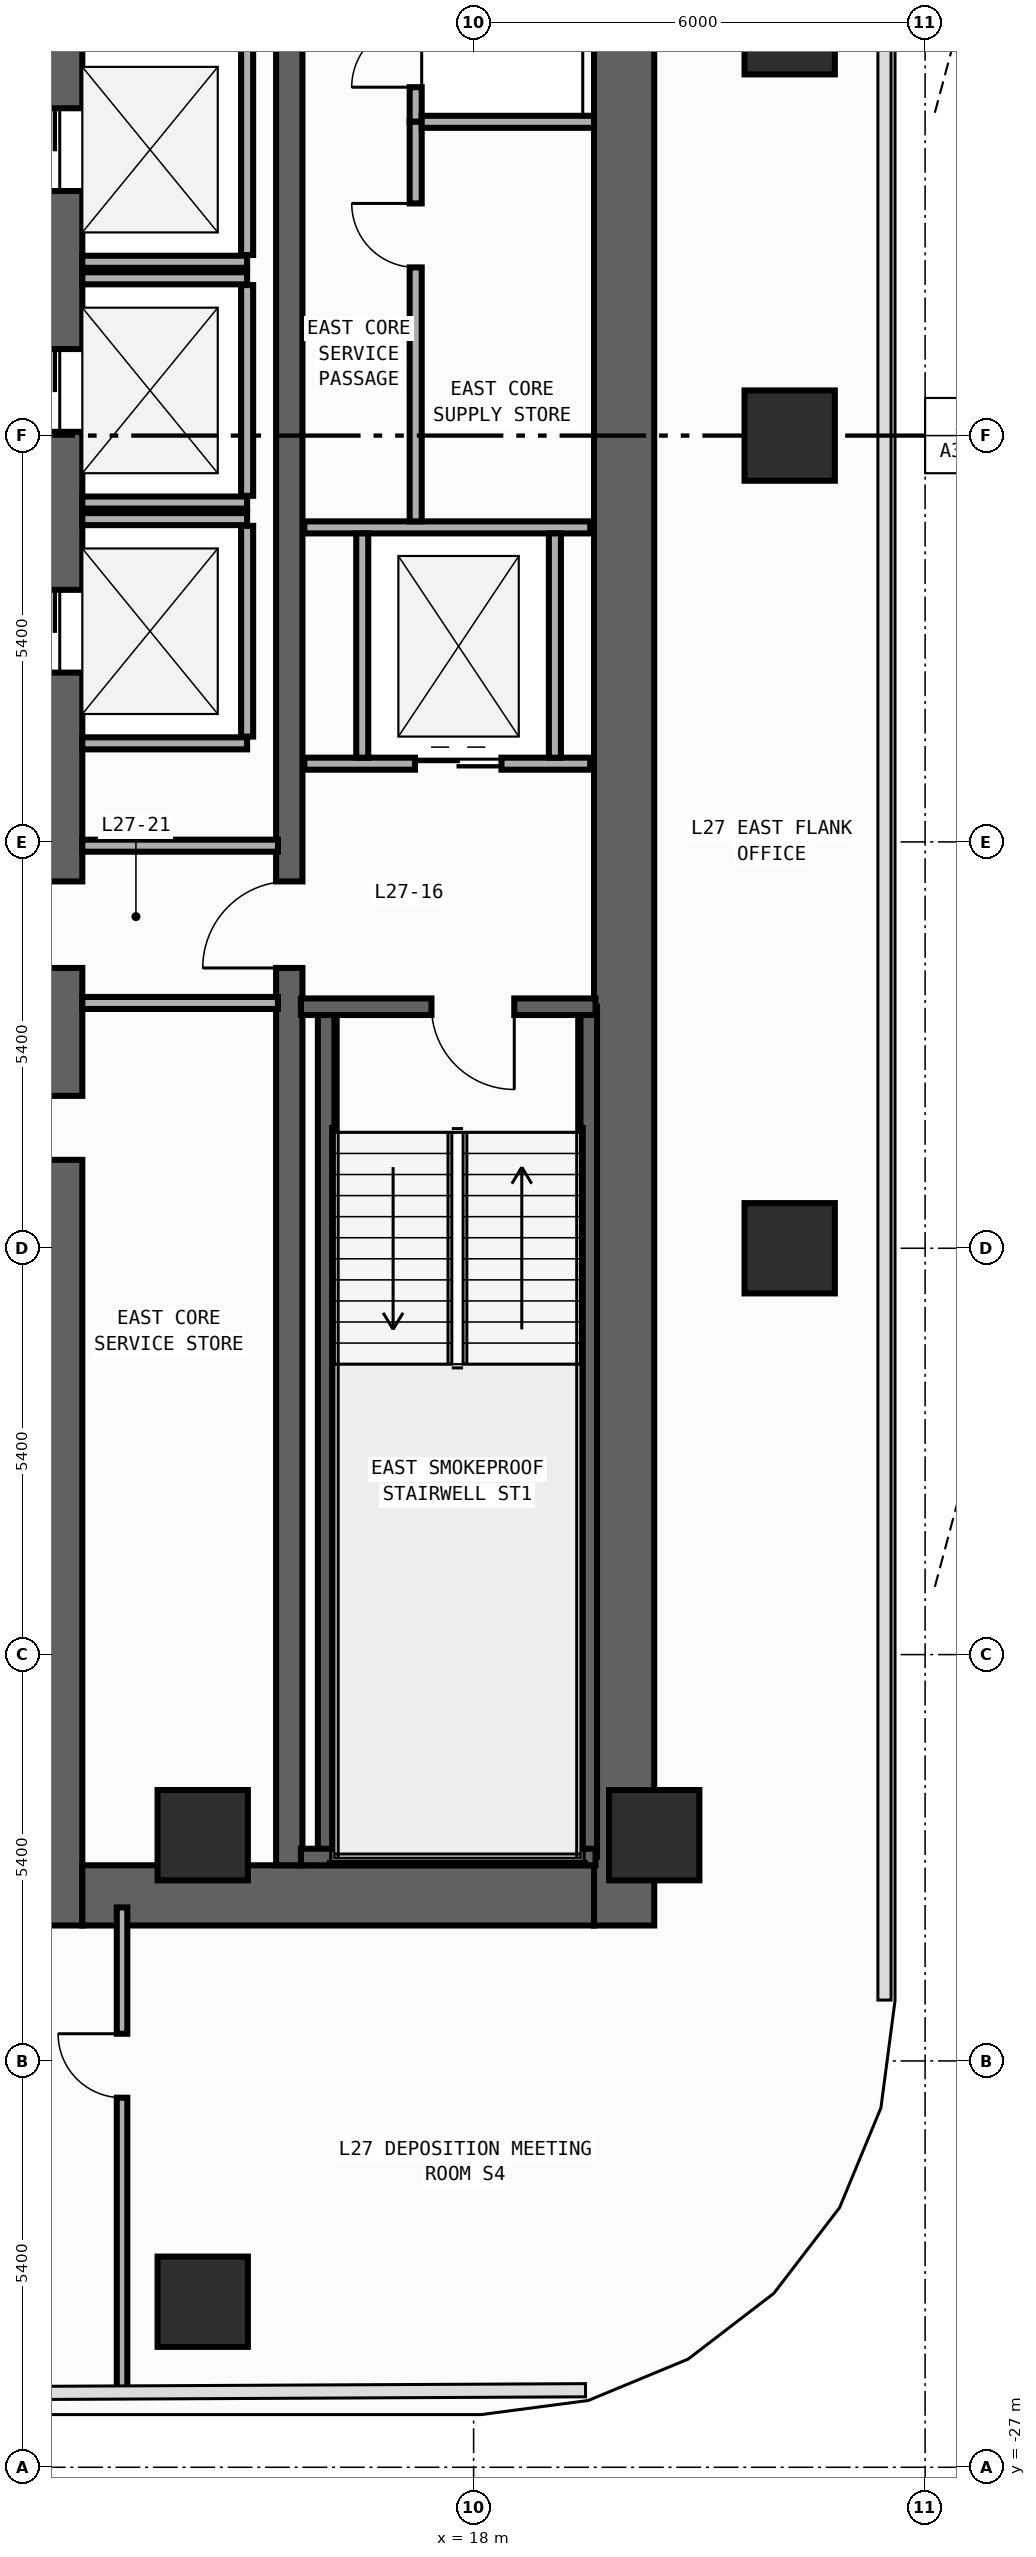
"""IFC4 building model, lengths in metres.
Left out: names, types, materials, properties, quantities, classifications, styles, units other than length and angle.
Written with IfcOpenShell. Run it as: python <this file> out.ifc"""

import sys

from ifc_helpers import new_model, si_unit, direction, frame, frame_2d, origin, origin_2d, place, context, subcontext, project, spatial, rectangle, extrude, element, fill, save


model = new_model("IFC4")
c1 = context("Model", 3, precision=1e-05, world=origin(), true_north=direction((0.0, 1.0)))
c2 = subcontext(c1, "Body", "Model", "MODEL_VIEW")
j1 = project(units=[si_unit("LENGTHUNIT", "METRE"), si_unit("PLANEANGLEUNIT", "RADIAN")], contexts=[c1])
p1 = place(None, origin())
s1 = spatial("IfcSite", under=j1, at=p1, CompositionType="ELEMENT")
p2 = place(p1, origin())
s2 = spatial("IfcBuilding", under=s1, at=p2, CompositionType="ELEMENT")
p3 = place(p2, frame((0.0, 0.0, 118.4)))
s3 = spatial("IfcBuildingStorey", under=s2, at=p3, CompositionType="ELEMENT", Elevation=118.4)
p4 = place(p3, frame((12.4, -19.8, 0.0), z_axis=(0.0, 0.0, 1.0), x_axis=(0.0, 1.0, 0.0)))
e1 = element("IfcWall", 1, at=p4, inside=s3, PredefinedType="SHEAR", context=c2, shape_type="SweptSolid", body=[
    extrude(rectangle(XDim=27.0, YDim=0.8, at=frame_2d((13.5, 0.0))), origin(), (0.0, 0.0, 1.0), 3.94),
])
p5 = place(p4, frame((23.05, 0.0, 0.0)))
e2 = element("IfcOpeningElement", 2, at=p5, cuts=e1, PredefinedType="OPENING", context=c2, shape_type="SweptSolid", body=[
    extrude(rectangle(XDim=1.1, YDim=2.2, at=frame_2d((0.55, 1.1))), frame((0.0, 0.41, 0.0), z_axis=(0.0, -1.0, 0.0), x_axis=(1.0, 0.0, 0.0)), (0.0, 0.0, 1.0), 0.82),
])
p6 = place(p4, frame((19.85, 0.0, 0.0)))
e3 = element("IfcOpeningElement", 3, at=p6, cuts=e1, PredefinedType="OPENING", context=c2, shape_type="SweptSolid", body=[
    extrude(rectangle(XDim=1.1, YDim=2.2, at=frame_2d((0.55, 1.1))), frame((0.0, 0.41, 0.0), z_axis=(0.0, -1.0, 0.0), x_axis=(1.0, 0.0, 0.0)), (0.0, 0.0, 1.0), 0.82),
])
p7 = place(p4, frame((16.65, 0.0, 0.0)))
e4 = element("IfcOpeningElement", 4, at=p7, cuts=e1, PredefinedType="OPENING", context=c2, shape_type="SweptSolid", body=[
    extrude(rectangle(XDim=1.1, YDim=2.2, at=frame_2d((0.55, 1.1))), frame((0.0, 0.41, 0.0), z_axis=(0.0, -1.0, 0.0), x_axis=(1.0, 0.0, 0.0)), (0.0, 0.0, 1.0), 0.82),
])
p8 = place(p4, frame((10.175, 0.0, 0.0)))
e5 = element("IfcOpeningElement", 5, at=p8, cuts=e1, PredefinedType="OPENING", context=c2, shape_type="SweptSolid", body=[
    extrude(rectangle(XDim=0.85, YDim=2.1, at=frame_2d((0.425, 1.05))), frame((0.0, 0.41, 0.0), z_axis=(0.0, -1.0, 0.0), x_axis=(1.0, 0.0, 0.0)), (0.0, 0.0, 1.0), 0.82),
])
p9 = place(p4, frame((12.725, 0.0, 0.0)))
e6 = element("IfcOpeningElement", 6, at=p9, cuts=e1, PredefinedType="OPENING", context=c2, shape_type="SweptSolid", body=[
    extrude(rectangle(XDim=1.15, YDim=2.2, at=frame_2d((0.575, 1.1))), frame((0.0, 0.41, 0.0), z_axis=(0.0, -1.0, 0.0), x_axis=(1.0, 0.0, 0.0)), (0.0, 0.0, 1.0), 0.82),
])
p10 = place(p4, frame((25.125, 0.0, 0.0)))
e7 = element("IfcOpeningElement", 7, at=p10, cuts=e1, PredefinedType="OPENING", context=c2, shape_type="SweptSolid", body=[
    extrude(rectangle(XDim=0.85, YDim=2.1, at=frame_2d((0.425, 1.05))), frame((0.0, 0.41, 0.0), z_axis=(0.0, -1.0, 0.0), x_axis=(1.0, 0.0, 0.0)), (0.0, 0.0, 1.0), 0.82),
])
p11 = place(p3, frame((20.0, -19.8, 0.0), z_axis=(0.0, 0.0, 1.0), x_axis=(0.0, 1.0, 0.0)))
e8 = element("IfcWall", 8, at=p11, inside=s3, PredefinedType="SHEAR", context=c2, shape_type="SweptSolid", body=[
    extrude(rectangle(XDim=27.0, YDim=0.8, at=frame_2d((13.5, 0.0))), origin(), (0.0, 0.0, 1.0), 3.94),
])
p12 = place(p3, frame((12.8, -19.4, 0.0), z_axis=(0.0, 0.0, 1.0), x_axis=(1.0, 0.0, 0.0)))
e9 = element("IfcWall", 9, at=p12, inside=s3, PredefinedType="SHEAR", context=c2, shape_type="SweptSolid", body=[
    extrude(rectangle(XDim=6.8, YDim=0.8, at=frame_2d((3.4, 0.0))), origin(), (0.0, 0.0, 1.0), 3.94),
])
p13 = place(p3, frame((15.55, -19.0, 0.0), z_axis=(0.0, 0.0, 1.0), x_axis=(0.0, 1.0, 0.0)))
e10 = element("IfcWall", 10, at=p13, inside=s3, PredefinedType="SHEAR", context=c2, shape_type="SweptSolid", body=[
    extrude(rectangle(XDim=25.4, YDim=0.35, at=frame_2d((12.7, 0.0))), origin(), (0.0, 0.0, 1.0), 3.94),
])
p14 = place(p13, frame((11.925, 0.0, 0.0)))
e11 = element("IfcOpeningElement", 11, at=p14, cuts=e10, PredefinedType="OPENING", context=c2, shape_type="SweptSolid", body=[
    extrude(rectangle(XDim=1.15, YDim=2.2, at=frame_2d((0.575, 1.1))), frame((0.0, 0.185, 0.0), z_axis=(0.0, -1.0, 0.0), x_axis=(1.0, 0.0, 0.0)), (0.0, 0.0, 1.0), 0.37),
])
p15 = place(p13, frame((24.325, 0.0, 0.0)))
e12 = element("IfcOpeningElement", 12, at=p15, cuts=e10, PredefinedType="OPENING", context=c2, shape_type="SweptSolid", body=[
    extrude(rectangle(XDim=0.85, YDim=2.1, at=frame_2d((0.425, 1.05))), frame((0.0, 0.185, 0.0), z_axis=(0.0, -1.0, 0.0), x_axis=(1.0, 0.0, 0.0)), (0.0, 0.0, 1.0), 0.37),
])
for number, where, z_axis, x_axis in (
    (13, (16.04, -18.89, 0.0), (0.0, 0.0, 1.0), (0.0, 1.0, 0.0)),
    (14, (19.53, -18.89, 0.0), (0.0, 0.0, 1.0), (0.0, 1.0, 0.0)),
):
    element("IfcWall", number, at=place(p3, frame(where, z_axis=z_axis, x_axis=x_axis)), inside=s3, PredefinedType="SHEAR", context=c2, shape_type="SweptSolid", body=[
        extrude(rectangle(XDim=11.3, YDim=0.22, at=frame_2d((5.65, 0.0))), origin(), (0.0, 0.0, 1.0), 3.94),
    ])
p16 = place(p3, frame((15.705, -18.89, 0.0), z_axis=(0.0, 0.0, 1.0), x_axis=(1.0, 0.0, 0.0)))
e15 = element("IfcWall", 15, at=p16, inside=s3, PredefinedType="SHEAR", context=c2, shape_type="SweptSolid", body=[
    extrude(rectangle(XDim=3.915, YDim=0.22, at=frame_2d((1.958, 0.0))), origin(), (0.0, 0.0, 1.0), 3.94),
])
p17 = place(p3, frame((19.62, -7.59, 0.0), z_axis=(0.0, 0.0, 1.0), x_axis=(-1.0, 0.0, 0.0)))
e16 = element("IfcWall", 16, at=p17, inside=s3, PredefinedType="SHEAR", context=c2, shape_type="SweptSolid", body=[
    extrude(rectangle(XDim=3.915, YDim=0.22, at=frame_2d((1.958, 0.0))), origin(), (0.0, 0.0, 1.0), 3.94),
])
p18 = place(p17, frame((1.08, 0.0, 0.0)))
e17 = element("IfcOpeningElement", 17, at=p18, cuts=e16, PredefinedType="OPENING", context=c2, shape_type="SweptSolid", body=[
    extrude(rectangle(XDim=1.1, YDim=2.2, at=frame_2d((0.55, 1.1))), frame((0.0, 0.12, 0.0), z_axis=(0.0, -1.0, 0.0), x_axis=(1.0, 0.0, 0.0)), (0.0, 0.0, 1.0), 0.24),
])
for number, where, z_axis, x_axis in (
    (18, (20.4, -18.6, 0.0), (0.0, 0.0, 1.0), (1.0, 0.0, 0.0)),
    (19, (14.4, -18.6, 0.0), (0.0, 0.0, 1.0), (1.0, 0.0, 0.0)),
    (20, (22.2, -10.8, 0.0), (0.0, 0.0, 1.0), (1.0, 0.0, 0.0)),
    (21, (22.2, 0.0, 0.0), (0.0, 0.0, 1.0), (1.0, 0.0, 0.0)),
    (22, (22.2, 5.4, 0.0), (0.0, 0.0, 1.0), (1.0, 0.0, 0.0)),
    (23, (14.4, -24.8, 0.0), (0.0, 0.0, 1.0), (1.0, 0.0, 0.0)),
):
    element("IfcColumn", number, at=place(p3, frame(where, z_axis=z_axis, x_axis=x_axis)), inside=s3, PredefinedType="COLUMN", context=c2, shape_type="SweptSolid", body=[
        extrude(rectangle(XDim=1.2, YDim=1.2, at=origin_2d()), origin(), (0.0, 0.0, 1.0), 4.2),
    ])
p19 = place(p3, frame((12.8, 2.31, 0.0), z_axis=(0.0, 0.0, 1.0), x_axis=(1.0, 0.0, 0.0)))
e24 = element("IfcWall", 24, at=p19, inside=s3, PredefinedType="STANDARD", context=c2, shape_type="SweptSolid", body=[
    extrude(rectangle(XDim=2.19, YDim=0.16, at=frame_2d((1.095, 0.0))), origin(), (0.0, 0.0, 1.0), 3.94),
])
p20 = place(p3, frame((14.99, 2.4, 0.0), z_axis=(0.0, 0.0, 1.0), x_axis=(0.0, 1.0, 0.0)))
e25 = element("IfcWall", 25, at=p20, inside=s3, PredefinedType="STANDARD", context=c2, shape_type="SweptSolid", body=[
    extrude(rectangle(XDim=2.8, YDim=0.16, at=frame_2d((1.4, 0.0))), origin(), (0.0, 0.0, 1.0), 3.94),
])
for number, where, z_axis, x_axis in (
    (26, (12.8, -0.89, 0.0), (0.0, 0.0, 1.0), (1.0, 0.0, 0.0)),
    (27, (12.8, 2.09, 0.0), (0.0, 0.0, 1.0), (1.0, 0.0, 0.0)),
):
    element("IfcWall", number, at=place(p3, frame(where, z_axis=z_axis, x_axis=x_axis)), inside=s3, PredefinedType="STANDARD", context=c2, shape_type="SweptSolid", body=[
        extrude(rectangle(XDim=2.19, YDim=0.16, at=frame_2d((1.095, 0.0))), origin(), (0.0, 0.0, 1.0), 3.94),
    ])
p21 = place(p3, frame((14.99, -0.8, 0.0), z_axis=(0.0, 0.0, 1.0), x_axis=(0.0, 1.0, 0.0)))
e28 = element("IfcWall", 28, at=p21, inside=s3, PredefinedType="STANDARD", context=c2, shape_type="SweptSolid", body=[
    extrude(rectangle(XDim=2.8, YDim=0.16, at=frame_2d((1.4, 0.0))), origin(), (0.0, 0.0, 1.0), 3.94),
])
for number, where, z_axis, x_axis in (
    (29, (12.8, -4.09, 0.0), (0.0, 0.0, 1.0), (1.0, 0.0, 0.0)),
    (30, (12.8, -1.11, 0.0), (0.0, 0.0, 1.0), (1.0, 0.0, 0.0)),
):
    element("IfcWall", number, at=place(p3, frame(where, z_axis=z_axis, x_axis=x_axis)), inside=s3, PredefinedType="STANDARD", context=c2, shape_type="SweptSolid", body=[
        extrude(rectangle(XDim=2.19, YDim=0.16, at=frame_2d((1.095, 0.0))), origin(), (0.0, 0.0, 1.0), 3.94),
    ])
p22 = place(p3, frame((14.99, -4.0, 0.0), z_axis=(0.0, 0.0, 1.0), x_axis=(0.0, 1.0, 0.0)))
e31 = element("IfcWall", 31, at=p22, inside=s3, PredefinedType="STANDARD", context=c2, shape_type="SweptSolid", body=[
    extrude(rectangle(XDim=2.8, YDim=0.16, at=frame_2d((1.4, 0.0))), origin(), (0.0, 0.0, 1.0), 3.94),
])
p23 = place(p3, frame((15.75, -4.36, 0.0), z_axis=(0.0, 0.0, 1.0), x_axis=(1.0, 0.0, 0.0)))
e32 = element("IfcWall", 32, at=p23, inside=s3, PredefinedType="STANDARD", context=c2, shape_type="SweptSolid", body=[
    extrude(rectangle(XDim=3.8, YDim=0.16, at=frame_2d((1.9, 0.0))), origin(), (0.0, 0.0, 1.0), 3.94),
])
p24 = place(p23, frame((1.47, 0.0, 0.0)))
e33 = element("IfcOpeningElement", 33, at=p24, cuts=e32, PredefinedType="OPENING", context=c2, shape_type="SweptSolid", body=[
    extrude(rectangle(XDim=1.15, YDim=2.2, at=frame_2d((0.575, 1.1))), frame((0.0, 0.09, 0.0), z_axis=(0.0, -1.0, 0.0), x_axis=(1.0, 0.0, 0.0)), (0.0, 0.0, 1.0), 0.18),
])
p25 = place(p3, frame((15.75, -1.22, 0.0), z_axis=(0.0, 0.0, 1.0), x_axis=(1.0, 0.0, 0.0)))
e34 = element("IfcWall", 34, at=p25, inside=s3, PredefinedType="STANDARD", context=c2, shape_type="SweptSolid", body=[
    extrude(rectangle(XDim=3.8, YDim=0.16, at=frame_2d((1.9, 0.0))), origin(), (0.0, 0.0, 1.0), 3.94),
])
for number, where, z_axis, x_axis in (
    (35, (16.52, -4.28, 0.0), (0.0, 0.0, 1.0), (0.0, 1.0, 0.0)),
    (36, (19.08, -4.28, 0.0), (0.0, 0.0, 1.0), (0.0, 1.0, 0.0)),
):
    element("IfcWall", number, at=place(p3, frame(where, z_axis=z_axis, x_axis=x_axis)), inside=s3, PredefinedType="STANDARD", context=c2, shape_type="SweptSolid", body=[
        extrude(rectangle(XDim=2.98, YDim=0.16, at=frame_2d((1.49, 0.0))), origin(), (0.0, 0.0, 1.0), 3.94),
    ])
for number, where, z_axis, x_axis in (
    (37, (12.8, -5.45, 0.0), (0.0, 0.0, 1.0), (1.0, 0.0, 0.0)),
    (38, (12.8, -7.54, 0.0), (0.0, 0.0, 1.0), (1.0, 0.0, 0.0)),
):
    element("IfcWall", number, at=place(p3, frame(where, z_axis=z_axis, x_axis=x_axis)), inside=s3, PredefinedType="STANDARD", context=c2, shape_type="SweptSolid", body=[
        extrude(rectangle(XDim=2.6, YDim=0.16, at=frame_2d((1.3, 0.0))), origin(), (0.0, 0.0, 1.0), 3.94),
    ])
p26 = place(p3, frame((17.23, 4.17, 0.0), z_axis=(0.0, 0.0, 1.0), x_axis=(0.0, 1.0, 0.0)))
e39 = element("IfcWall", 39, at=p26, inside=s3, PredefinedType="PARTITIONING", context=c2, shape_type="SweptSolid", body=[
    extrude(rectangle(XDim=2.23, YDim=0.16, at=frame_2d((1.115, 0.0))), origin(), (0.0, 0.0, 1.0), 3.94),
])
p27 = place(p26, frame((0.46, 0.0, 0.0)))
e40 = element("IfcOpeningElement", 40, at=p27, cuts=e39, PredefinedType="OPENING", context=c2, shape_type="SweptSolid", body=[
    extrude(rectangle(XDim=0.85, YDim=2.1, at=frame_2d((0.425, 1.05))), frame((0.0, 0.09, 0.0), z_axis=(0.0, -1.0, 0.0), x_axis=(1.0, 0.0, 0.0)), (0.0, 0.0, 1.0), 0.18),
])
p28 = place(p3, frame((17.23, -1.14, 0.0), z_axis=(0.0, 0.0, 1.0), x_axis=(0.0, 1.0, 0.0)))
e41 = element("IfcWall", 41, at=p28, inside=s3, PredefinedType="PARTITIONING", context=c2, shape_type="SweptSolid", body=[
    extrude(rectangle(XDim=5.31, YDim=0.16, at=frame_2d((2.655, 0.0))), origin(), (0.0, 0.0, 1.0), 3.94),
])
p29 = place(p28, frame((3.375, 0.0, 0.0)))
e42 = element("IfcOpeningElement", 42, at=p29, cuts=e41, PredefinedType="OPENING", context=c2, shape_type="SweptSolid", body=[
    extrude(rectangle(XDim=0.85, YDim=2.1, at=frame_2d((0.425, 1.05))), frame((0.0, 0.09, 0.0), z_axis=(0.0, -1.0, 0.0), x_axis=(1.0, 0.0, 0.0)), (0.0, 0.0, 1.0), 0.18),
])
p30 = place(p3, frame((17.31, 4.17, 0.0), z_axis=(0.0, 0.0, 1.0), x_axis=(1.0, 0.0, 0.0)))
e43 = element("IfcWall", 43, at=p30, inside=s3, PredefinedType="PARTITIONING", context=c2, shape_type="SweptSolid", body=[
    extrude(rectangle(XDim=2.29, YDim=0.16, at=frame_2d((1.145, 0.0))), origin(), (0.0, 0.0, 1.0), 3.94),
])
p31 = place(p3, frame((13.328, -26.001, 0.0), z_axis=(0.0, 0.0, 1.0), x_axis=(0.0, 1.0, 0.0)))
e44 = element("IfcWall", 44, at=p31, inside=s3, PredefinedType="PARTITIONING", context=c2, shape_type="SweptSolid", body=[
    extrude(rectangle(XDim=6.441, YDim=0.14, at=frame_2d((3.221, 0.0))), origin(), (0.0, 0.0, 1.0), 3.94),
])
p32 = place(p31, frame((3.913, 0.0, 0.0)))
e45 = element("IfcOpeningElement", 45, at=p32, cuts=e44, PredefinedType="OPENING", context=c2, shape_type="SweptSolid", body=[
    extrude(rectangle(XDim=0.85, YDim=2.1, at=frame_2d((0.425, 1.05))), frame((0.0, 0.08, 0.0), z_axis=(0.0, -1.0, 0.0), x_axis=(1.0, 0.0, 0.0)), (0.0, 0.0, 1.0), 0.16),
])
p33 = place(p18, origin())
e46 = element("IfcDoor", 46, at=p33, inside=s3, OperationType="SINGLE_SWING_LEFT", PredefinedType="DOOR", context=c2, shape_type="SweptSolid", body=[
    extrude(rectangle(XDim=1.1, YDim=2.2, at=frame_2d((0.55, 1.1))), frame((0.0, 0.025, 0.0), z_axis=(0.0, -1.0, 0.0), x_axis=(1.0, 0.0, 0.0)), (0.0, 0.0, 1.0), 0.05),
])
fill(e17, e46)
p34 = place(p5, origin())
e47 = element("IfcDoor", 47, at=p34, inside=s3, OperationType="DOUBLE_DOOR_SLIDING", PredefinedType="DOOR", context=c2, shape_type="SweptSolid", body=[
    extrude(rectangle(XDim=1.1, YDim=2.2, at=frame_2d((0.55, 1.1))), frame((0.0, 0.025, 0.0), z_axis=(0.0, -1.0, 0.0), x_axis=(1.0, 0.0, 0.0)), (0.0, 0.0, 1.0), 0.05),
])
fill(e2, e47)
p35 = place(p6, origin())
e48 = element("IfcDoor", 48, at=p35, inside=s3, OperationType="DOUBLE_DOOR_SLIDING", PredefinedType="DOOR", context=c2, shape_type="SweptSolid", body=[
    extrude(rectangle(XDim=1.1, YDim=2.2, at=frame_2d((0.55, 1.1))), frame((0.0, 0.025, 0.0), z_axis=(0.0, -1.0, 0.0), x_axis=(1.0, 0.0, 0.0)), (0.0, 0.0, 1.0), 0.05),
])
fill(e3, e48)
p36 = place(p7, origin())
e49 = element("IfcDoor", 49, at=p36, inside=s3, OperationType="DOUBLE_DOOR_SLIDING", PredefinedType="DOOR", context=c2, shape_type="SweptSolid", body=[
    extrude(rectangle(XDim=1.1, YDim=2.2, at=frame_2d((0.55, 1.1))), frame((0.0, 0.025, 0.0), z_axis=(0.0, -1.0, 0.0), x_axis=(1.0, 0.0, 0.0)), (0.0, 0.0, 1.0), 0.05),
])
fill(e4, e49)
p37 = place(p8, origin())
e50 = element("IfcDoor", 50, at=p37, inside=s3, OperationType="SINGLE_SWING_LEFT", PredefinedType="DOOR", context=c2, shape_type="SweptSolid", body=[
    extrude(rectangle(XDim=0.85, YDim=2.1, at=frame_2d((0.425, 1.05))), frame((0.0, 0.025, 0.0), z_axis=(0.0, -1.0, 0.0), x_axis=(1.0, 0.0, 0.0)), (0.0, 0.0, 1.0), 0.05),
])
fill(e5, e50)
p38 = place(p9, origin())
e51 = element("IfcDoor", 51, at=p38, inside=s3, OperationType="SINGLE_SWING_RIGHT", PredefinedType="DOOR", context=c2, shape_type="SweptSolid", body=[
    extrude(rectangle(XDim=1.15, YDim=2.2, at=frame_2d((0.575, 1.1))), frame((0.0, 0.025, 0.0), z_axis=(0.0, -1.0, 0.0), x_axis=(1.0, 0.0, 0.0)), (0.0, 0.0, 1.0), 0.05),
])
fill(e6, e51)
p39 = place(p14, origin())
e52 = element("IfcDoor", 52, at=p39, inside=s3, OperationType="SINGLE_SWING_LEFT", PredefinedType="DOOR", context=c2, shape_type="SweptSolid", body=[
    extrude(rectangle(XDim=1.15, YDim=2.2, at=frame_2d((0.575, 1.1))), frame((0.0, 0.025, 0.0), z_axis=(0.0, -1.0, 0.0), x_axis=(1.0, 0.0, 0.0)), (0.0, 0.0, 1.0), 0.05),
])
fill(e11, e52)
p40 = place(p24, origin())
e53 = element("IfcDoor", 53, at=p40, inside=s3, OperationType="DOUBLE_DOOR_SLIDING", PredefinedType="DOOR", context=c2, shape_type="SweptSolid", body=[
    extrude(rectangle(XDim=1.15, YDim=2.2, at=frame_2d((0.575, 1.1))), frame((0.0, 0.025, 0.0), z_axis=(0.0, -1.0, 0.0), x_axis=(1.0, 0.0, 0.0)), (0.0, 0.0, 1.0), 0.05),
])
fill(e33, e53)
p41 = place(p27, origin())
e54 = element("IfcDoor", 54, at=p41, inside=s3, OperationType="SINGLE_SWING_LEFT", PredefinedType="DOOR", context=c2, shape_type="SweptSolid", body=[
    extrude(rectangle(XDim=0.85, YDim=2.1, at=frame_2d((0.425, 1.05))), frame((0.0, 0.025, 0.0), z_axis=(0.0, -1.0, 0.0), x_axis=(1.0, 0.0, 0.0)), (0.0, 0.0, 1.0), 0.05),
])
fill(e40, e54)
p42 = place(p29, origin())
e55 = element("IfcDoor", 55, at=p42, inside=s3, OperationType="SINGLE_SWING_RIGHT", PredefinedType="DOOR", context=c2, shape_type="SweptSolid", body=[
    extrude(rectangle(XDim=0.85, YDim=2.1, at=frame_2d((0.425, 1.05))), frame((0.0, 0.025, 0.0), z_axis=(0.0, -1.0, 0.0), x_axis=(1.0, 0.0, 0.0)), (0.0, 0.0, 1.0), 0.05),
])
fill(e42, e55)
p43 = place(p32, origin())
e56 = element("IfcDoor", 56, at=p43, inside=s3, OperationType="SINGLE_SWING_RIGHT", PredefinedType="DOOR", context=c2, shape_type="SweptSolid", body=[
    extrude(rectangle(XDim=0.85, YDim=2.1, at=frame_2d((0.425, 1.05))), frame((0.0, 0.025, 0.0), z_axis=(0.0, -1.0, 0.0), x_axis=(1.0, 0.0, 0.0)), (0.0, 0.0, 1.0), 0.05),
])
fill(e45, e56)
save(model, sys.argv[1])
